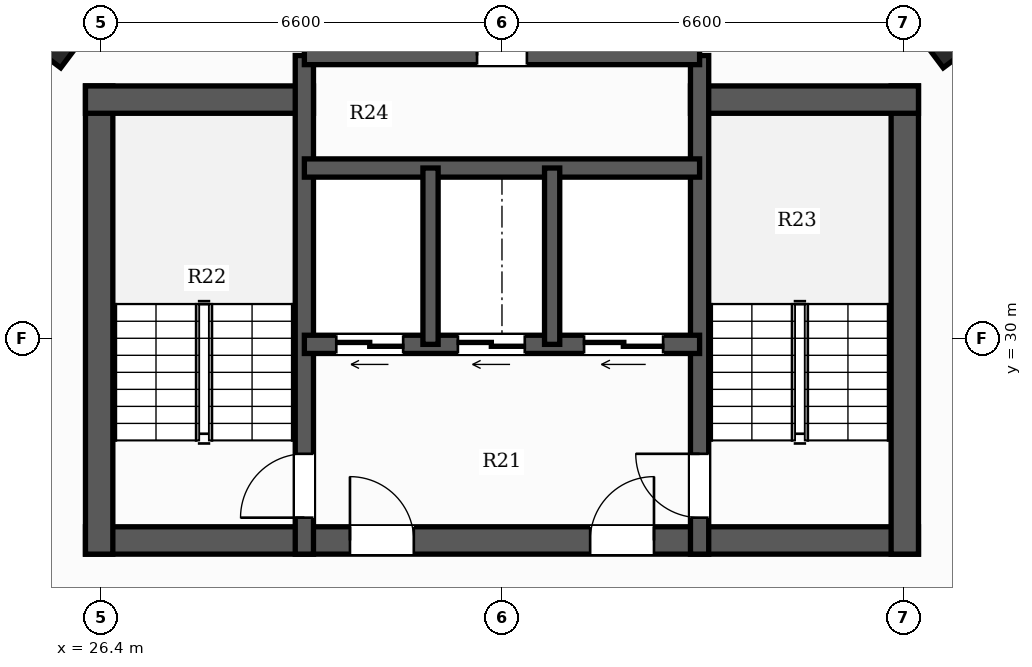
"""IFC4 building model, lengths in metres.
Left out: names, types, materials, properties, quantities, classifications, styles, units other than length and angle.
Written with IfcOpenShell. Run it as: python <this file> out.ifc"""

import sys

from ifc_helpers import new_model, si_unit, direction, frame, frame_2d, origin, origin_2d, place, context, subcontext, project, spatial, rectangle, hollow_rectangle, extrude, element, fill, save


model = new_model("IFC4")
c1 = context("Model", 3, precision=1e-05, world=origin(), true_north=direction((0.0, 1.0)))
c2 = subcontext(c1, "Body", "Model", "MODEL_VIEW")
j1 = project(units=[si_unit("LENGTHUNIT", "METRE"), si_unit("PLANEANGLEUNIT", "RADIAN")], contexts=[c1])
p1 = place(None, origin())
s1 = spatial("IfcSite", under=j1, at=p1, CompositionType="ELEMENT")
p2 = place(p1, origin())
s2 = spatial("IfcBuilding", under=s1, at=p2, CompositionType="ELEMENT")
p3 = place(p2, frame((0.0, 0.0, 53.3)))
s3 = spatial("IfcBuildingStorey", under=s2, at=p3, CompositionType="ELEMENT", Elevation=53.3)
p4 = place(p3, frame((26.15, 26.675, 0.0), z_axis=(0.0, 0.0, 1.0), x_axis=(1.0, 0.0, 0.0)))
e1 = element("IfcWall", 1, at=p4, inside=s3, PredefinedType="SHEAR", context=c2, shape_type="SweptSolid", body=[
    extrude(rectangle(XDim=13.7, YDim=0.45, at=frame_2d((6.85, 0.0))), origin(), (0.0, 0.0, 1.0), 3.3),
])
p5 = place(p4, frame((4.35, 0.0, 0.0)))
e2 = element("IfcOpeningElement", 2, at=p5, cuts=e1, PredefinedType="OPENING", context=c2, shape_type="SweptSolid", body=[
    extrude(rectangle(XDim=1.05, YDim=2.15, at=frame_2d((0.525, 1.075))), frame((0.0, 0.235, 0.0), z_axis=(0.0, -1.0, 0.0), x_axis=(1.0, 0.0, 0.0)), (0.0, 0.0, 1.0), 0.47),
])
p6 = place(p4, frame((8.3, 0.0, 0.0)))
e3 = element("IfcOpeningElement", 3, at=p6, cuts=e1, PredefinedType="OPENING", context=c2, shape_type="SweptSolid", body=[
    extrude(rectangle(XDim=1.05, YDim=2.15, at=frame_2d((0.525, 1.075))), frame((0.0, 0.235, 0.0), z_axis=(0.0, -1.0, 0.0), x_axis=(1.0, 0.0, 0.0)), (0.0, 0.0, 1.0), 0.47),
])
p7 = place(p3, frame((26.375, 26.45, 0.0), z_axis=(0.0, 0.0, 1.0), x_axis=(0.0, 1.0, 0.0)))
e4 = element("IfcWall", 4, at=p7, inside=s3, PredefinedType="SHEAR", context=c2, shape_type="SweptSolid", body=[
    extrude(rectangle(XDim=7.7, YDim=0.45, at=frame_2d((3.85, 0.0))), origin(), (0.0, 0.0, 1.0), 3.3),
])
p8 = place(p3, frame((26.15, 33.925, 0.0), z_axis=(0.0, 0.0, 1.0), x_axis=(1.0, 0.0, 0.0)))
e5 = element("IfcWall", 5, at=p8, inside=s3, PredefinedType="SHEAR", context=c2, shape_type="SweptSolid", body=[
    extrude(rectangle(XDim=3.75, YDim=0.45, at=frame_2d((1.875, 0.0))), origin(), (0.0, 0.0, 1.0), 3.3),
])
p9 = place(p3, frame((39.625, 26.45, 0.0), z_axis=(0.0, 0.0, 1.0), x_axis=(0.0, 1.0, 0.0)))
e6 = element("IfcWall", 6, at=p9, inside=s3, PredefinedType="SHEAR", context=c2, shape_type="SweptSolid", body=[
    extrude(rectangle(XDim=7.7, YDim=0.45, at=frame_2d((3.85, 0.0))), origin(), (0.0, 0.0, 1.0), 3.3),
])
p10 = place(p3, frame((36.1, 33.925, 0.0), z_axis=(0.0, 0.0, 1.0), x_axis=(1.0, 0.0, 0.0)))
e7 = element("IfcWall", 7, at=p10, inside=s3, PredefinedType="SHEAR", context=c2, shape_type="SweptSolid", body=[
    extrude(rectangle(XDim=3.75, YDim=0.45, at=frame_2d((1.875, 0.0))), origin(), (0.0, 0.0, 1.0), 3.3),
])
p11 = place(p3, frame((29.75, 26.45, 0.0), z_axis=(0.0, 0.0, 1.0), x_axis=(0.0, 1.0, 0.0)))
e8 = element("IfcWall", 8, at=p11, inside=s3, PredefinedType="SHEAR", context=c2, shape_type="SweptSolid", body=[
    extrude(rectangle(XDim=8.2, YDim=0.3, at=frame_2d((4.1, 0.0))), origin(), (0.0, 0.0, 1.0), 3.3),
])
p12 = place(p11, frame((0.6, 0.0, 0.0)))
e9 = element("IfcOpeningElement", 9, at=p12, cuts=e8, PredefinedType="OPENING", context=c2, shape_type="SweptSolid", body=[
    extrude(rectangle(XDim=1.05, YDim=2.15, at=frame_2d((0.525, 1.075))), frame((0.0, 0.16, 0.0), z_axis=(0.0, -1.0, 0.0), x_axis=(1.0, 0.0, 0.0)), (0.0, 0.0, 1.0), 0.32),
])
p13 = place(p3, frame((36.25, 26.45, 0.0), z_axis=(0.0, 0.0, 1.0), x_axis=(0.0, 1.0, 0.0)))
e10 = element("IfcWall", 10, at=p13, inside=s3, PredefinedType="SHEAR", context=c2, shape_type="SweptSolid", body=[
    extrude(rectangle(XDim=8.2, YDim=0.3, at=frame_2d((4.1, 0.0))), origin(), (0.0, 0.0, 1.0), 3.3),
])
p14 = place(p13, frame((0.6, 0.0, 0.0)))
e11 = element("IfcOpeningElement", 11, at=p14, cuts=e10, PredefinedType="OPENING", context=c2, shape_type="SweptSolid", body=[
    extrude(rectangle(XDim=1.05, YDim=2.15, at=frame_2d((0.525, 1.075))), frame((0.0, 0.16, 0.0), z_axis=(0.0, -1.0, 0.0), x_axis=(1.0, 0.0, 0.0)), (0.0, 0.0, 1.0), 0.32),
])
p15 = place(p3, frame((36.25, 29.9, 0.0), z_axis=(0.0, 0.0, 1.0), x_axis=(-1.0, 0.0, 0.0)))
e12 = element("IfcWall", 12, at=p15, inside=s3, PredefinedType="SHEAR", context=c2, shape_type="SweptSolid", body=[
    extrude(rectangle(XDim=6.5, YDim=0.3, at=frame_2d((3.25, 0.0))), origin(), (0.0, 0.0, 1.0), 3.3),
])
p16 = place(p15, frame((4.875, 0.0, 0.0)))
e13 = element("IfcOpeningElement", 13, at=p16, cuts=e12, PredefinedType="OPENING", context=c2, shape_type="SweptSolid", body=[
    extrude(rectangle(XDim=1.1, YDim=2.2, at=frame_2d((0.55, 1.1))), frame((0.0, 0.16, 0.0), z_axis=(0.0, -1.0, 0.0), x_axis=(1.0, 0.0, 0.0)), (0.0, 0.0, 1.0), 0.32),
])
p17 = place(p15, frame((2.875, 0.0, 0.0)))
e14 = element("IfcOpeningElement", 14, at=p17, cuts=e12, PredefinedType="OPENING", context=c2, shape_type="SweptSolid", body=[
    extrude(rectangle(XDim=1.1, YDim=2.2, at=frame_2d((0.55, 1.1))), frame((0.0, 0.16, 0.0), z_axis=(0.0, -1.0, 0.0), x_axis=(1.0, 0.0, 0.0)), (0.0, 0.0, 1.0), 0.32),
])
p18 = place(p15, frame((0.6, 0.0, 0.0)))
e15 = element("IfcOpeningElement", 15, at=p18, cuts=e12, PredefinedType="OPENING", context=c2, shape_type="SweptSolid", body=[
    extrude(rectangle(XDim=1.3, YDim=2.2, at=frame_2d((0.65, 1.1))), frame((0.0, 0.16, 0.0), z_axis=(0.0, -1.0, 0.0), x_axis=(1.0, 0.0, 0.0)), (0.0, 0.0, 1.0), 0.32),
])
p19 = place(p3, frame((29.75, 32.8, 0.0), z_axis=(0.0, 0.0, 1.0), x_axis=(1.0, 0.0, 0.0)))
e16 = element("IfcWall", 16, at=p19, inside=s3, PredefinedType="SHEAR", context=c2, shape_type="SweptSolid", body=[
    extrude(rectangle(XDim=6.5, YDim=0.3, at=frame_2d((3.25, 0.0))), origin(), (0.0, 0.0, 1.0), 3.3),
])
for number, where, z_axis, x_axis in (
    (17, (31.825, 29.9, 0.0), (0.0, 0.0, 1.0), (0.0, 1.0, 0.0)),
    (18, (33.825, 29.9, 0.0), (0.0, 0.0, 1.0), (0.0, 1.0, 0.0)),
):
    element("IfcWall", number, at=place(p3, frame(where, z_axis=z_axis, x_axis=x_axis)), inside=s3, PredefinedType="SHEAR", context=c2, shape_type="SweptSolid", body=[
        extrude(rectangle(XDim=2.9, YDim=0.25, at=frame_2d((1.45, 0.0))), origin(), (0.0, 0.0, 1.0), 3.3),
    ])
p20 = place(p3, frame((29.75, 34.65, 0.0), z_axis=(0.0, 0.0, 1.0), x_axis=(1.0, 0.0, 0.0)))
e19 = element("IfcWall", 19, at=p20, inside=s3, PredefinedType="SHEAR", context=c2, shape_type="SweptSolid", body=[
    extrude(rectangle(XDim=6.5, YDim=0.3, at=frame_2d((3.25, 0.0))), origin(), (0.0, 0.0, 1.0), 3.3),
])
p21 = place(p20, frame((2.84, 0.0, 0.0)))
e20 = element("IfcOpeningElement", 20, at=p21, cuts=e19, PredefinedType="OPENING", context=c2, shape_type="SweptSolid", body=[
    extrude(rectangle(XDim=0.82, YDim=2.1, at=frame_2d((0.41, 1.05))), frame((0.0, 0.16, 0.0), z_axis=(0.0, -1.0, 0.0), x_axis=(1.0, 0.0, 0.0)), (0.0, 0.0, 1.0), 0.32),
])
for number, where, z_axis, x_axis in (
    (21, (25.648, 35.113, 0.0), (0.0, 0.0, 1.0), (0.6, 0.8, 0.0)),
    (22, (40.352, 35.113, 0.0), (0.0, 0.0, 1.0), (-0.6, 0.8, 0.0)),
):
    element("IfcColumn", number, at=place(p3, frame(where, z_axis=z_axis, x_axis=x_axis)), inside=s3, PredefinedType="COLUMN", context=c2, shape_type="SweptSolid", body=[
        extrude(hollow_rectangle(XDim=0.95, YDim=0.95, WallThickness=0.032, at=origin_2d()), origin(), (0.0, 0.0, 1.0), 3.3),
    ])
p22 = place(p12, origin())
e23 = element("IfcDoor", 23, at=p22, inside=s3, OperationType="SINGLE_SWING_LEFT", PredefinedType="DOOR", context=c2, shape_type="SweptSolid", body=[
    extrude(rectangle(XDim=1.05, YDim=2.15, at=frame_2d((0.525, 1.075))), frame((0.0, 0.025, 0.0), z_axis=(0.0, -1.0, 0.0), x_axis=(1.0, 0.0, 0.0)), (0.0, 0.0, 1.0), 0.05),
])
fill(e9, e23)
p23 = place(p14, origin())
e24 = element("IfcDoor", 24, at=p23, inside=s3, OperationType="SINGLE_SWING_RIGHT", PredefinedType="DOOR", context=c2, shape_type="SweptSolid", body=[
    extrude(rectangle(XDim=1.05, YDim=2.15, at=frame_2d((0.525, 1.075))), frame((0.0, 0.025, 0.0), z_axis=(0.0, -1.0, 0.0), x_axis=(1.0, 0.0, 0.0)), (0.0, 0.0, 1.0), 0.05),
])
fill(e11, e24)
p24 = place(p5, origin())
e25 = element("IfcDoor", 25, at=p24, inside=s3, OperationType="SINGLE_SWING_LEFT", PredefinedType="DOOR", context=c2, shape_type="SweptSolid", body=[
    extrude(rectangle(XDim=1.05, YDim=2.15, at=frame_2d((0.525, 1.075))), frame((0.0, 0.025, 0.0), z_axis=(0.0, -1.0, 0.0), x_axis=(1.0, 0.0, 0.0)), (0.0, 0.0, 1.0), 0.05),
])
fill(e2, e25)
p25 = place(p6, origin())
e26 = element("IfcDoor", 26, at=p25, inside=s3, OperationType="SINGLE_SWING_RIGHT", PredefinedType="DOOR", context=c2, shape_type="SweptSolid", body=[
    extrude(rectangle(XDim=1.05, YDim=2.15, at=frame_2d((0.525, 1.075))), frame((0.0, 0.025, 0.0), z_axis=(0.0, -1.0, 0.0), x_axis=(1.0, 0.0, 0.0)), (0.0, 0.0, 1.0), 0.05),
])
fill(e3, e26)
p26 = place(p16, origin())
e27 = element("IfcDoor", 27, at=p26, inside=s3, OperationType="DOUBLE_DOOR_SLIDING", PredefinedType="DOOR", context=c2, shape_type="SweptSolid", body=[
    extrude(rectangle(XDim=1.1, YDim=2.2, at=frame_2d((0.55, 1.1))), frame((0.0, 0.025, 0.0), z_axis=(0.0, -1.0, 0.0), x_axis=(1.0, 0.0, 0.0)), (0.0, 0.0, 1.0), 0.05),
])
fill(e13, e27)
p27 = place(p17, origin())
e28 = element("IfcDoor", 28, at=p27, inside=s3, OperationType="DOUBLE_DOOR_SLIDING", PredefinedType="DOOR", context=c2, shape_type="SweptSolid", body=[
    extrude(rectangle(XDim=1.1, YDim=2.2, at=frame_2d((0.55, 1.1))), frame((0.0, 0.025, 0.0), z_axis=(0.0, -1.0, 0.0), x_axis=(1.0, 0.0, 0.0)), (0.0, 0.0, 1.0), 0.05),
])
fill(e14, e28)
p28 = place(p18, origin())
e29 = element("IfcDoor", 29, at=p28, inside=s3, OperationType="DOUBLE_DOOR_SLIDING", PredefinedType="DOOR", context=c2, shape_type="SweptSolid", body=[
    extrude(rectangle(XDim=1.3, YDim=2.2, at=frame_2d((0.65, 1.1))), frame((0.0, 0.025, 0.0), z_axis=(0.0, -1.0, 0.0), x_axis=(1.0, 0.0, 0.0)), (0.0, 0.0, 1.0), 0.05),
])
fill(e15, e29)
p29 = place(p21, origin())
e30 = element("IfcDoor", 30, at=p29, inside=s3, OperationType="SINGLE_SWING_LEFT", PredefinedType="DOOR", context=c2, shape_type="SweptSolid", body=[
    extrude(rectangle(XDim=0.82, YDim=2.1, at=frame_2d((0.41, 1.05))), frame((0.0, 0.025, 0.0), z_axis=(0.0, -1.0, 0.0), x_axis=(1.0, 0.0, 0.0)), (0.0, 0.0, 1.0), 0.05),
])
fill(e20, e30)
save(model, sys.argv[1])
